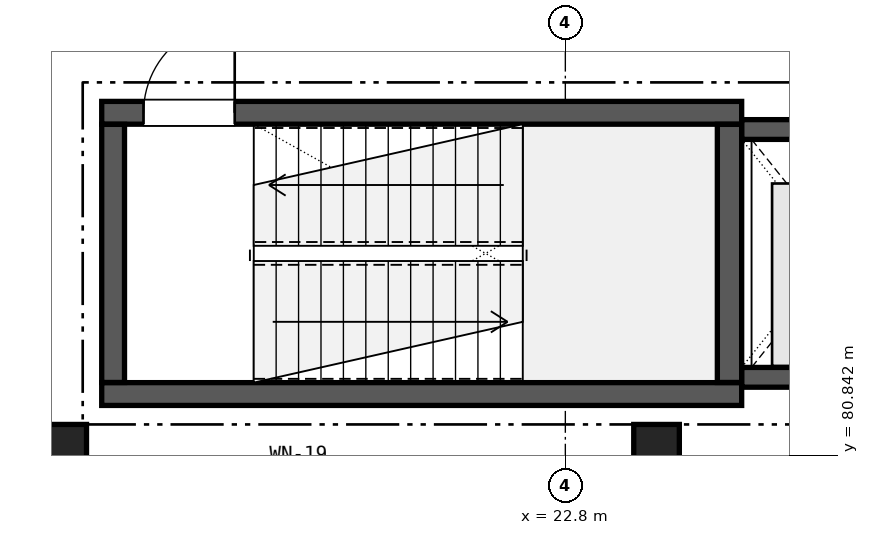
"""IFC4 building model, lengths in metres.
Left out: names, types, materials, properties, quantities, classifications, styles, units other than length and angle.
Written with IfcOpenShell. Run it as: python <this file> out.ifc"""

import sys

from ifc_helpers import new_model, si_unit, direction, frame, frame_2d, origin, origin_2d, place, context, subcontext, project, spatial, rectangle, extrude, element, fill, save


model = new_model("IFC4")
c1 = context("Model", 3, precision=1e-05, world=origin(), true_north=direction((0.0, 1.0)))
c2 = subcontext(c1, "Body", "Model", "MODEL_VIEW")
j1 = project(units=[si_unit("LENGTHUNIT", "METRE"), si_unit("PLANEANGLEUNIT", "RADIAN")], contexts=[c1])
p1 = place(None, origin())
s1 = spatial("IfcSite", under=j1, at=p1, CompositionType="ELEMENT")
p2 = place(p1, origin())
s2 = spatial("IfcBuilding", under=s1, at=p2, CompositionType="ELEMENT")
p3 = place(p2, frame((0.0, 0.0, 5.1)))
s3 = spatial("IfcBuildingStorey", under=s2, at=p3, CompositionType="ELEMENT", Elevation=5.1)
for number, where, z_axis, x_axis in (
    (1, (16.2, 80.95, 0.0), (0.0, 0.0, 1.0), (1.0, 0.0, 0.0)),
    (2, (24.0, 80.95, 0.0), (0.0, 0.0, 1.0), (1.0, 0.0, 0.0)),
):
    element("IfcColumn", number, at=place(p3, frame(where, z_axis=z_axis, x_axis=x_axis)), inside=s3, PredefinedType="COLUMN", context=c2, shape_type="SweptSolid", body=[
        extrude(rectangle(XDim=0.6, YDim=0.6, at=origin_2d()), origin(), (0.0, 0.0, 1.0), 4.42),
    ])
p4 = place(p3, frame((16.7, 81.65, 0.0), z_axis=(0.0, 0.0, 1.0), x_axis=(1.0, 0.0, 0.0)))
e3 = element("IfcWall", 3, at=p4, inside=s3, PredefinedType="SHEAR", context=c2, shape_type="SweptSolid", body=[
    extrude(rectangle(XDim=8.42, YDim=0.3, at=frame_2d((4.21, 0.0))), origin(), (0.0, 0.0, 1.0), 4.13),
])
p5 = place(p3, frame((16.7, 85.35, 0.0), z_axis=(0.0, 0.0, 1.0), x_axis=(1.0, 0.0, 0.0)))
e4 = element("IfcWall", 4, at=p5, inside=s3, PredefinedType="SHEAR", context=c2, shape_type="SweptSolid", body=[
    extrude(rectangle(XDim=8.42, YDim=0.3, at=frame_2d((4.21, 0.0))), origin(), (0.0, 0.0, 1.0), 4.13),
])
p6 = place(p5, frame((0.55, 0.0, 0.0)))
e5 = element("IfcOpeningElement", 5, at=p6, cuts=e4, PredefinedType="OPENING", context=c2, shape_type="SweptSolid", body=[
    extrude(rectangle(XDim=1.2, YDim=2.2, at=frame_2d((0.6, 1.1))), frame((0.0, 0.16, 0.0), z_axis=(0.0, -1.0, 0.0), x_axis=(1.0, 0.0, 0.0)), (0.0, 0.0, 1.0), 0.32),
])
p7 = place(p3, frame((16.85, 81.802, 0.0), z_axis=(0.0, 0.0, 1.0), x_axis=(0.0, 1.0, 0.0)))
e6 = element("IfcWall", 6, at=p7, inside=s3, PredefinedType="SHEAR", context=c2, shape_type="SweptSolid", body=[
    extrude(rectangle(XDim=3.396, YDim=0.3, at=frame_2d((1.698, 0.0))), origin(), (0.0, 0.0, 1.0), 4.13),
])
p8 = place(p3, frame((24.96, 81.802, 0.0), z_axis=(0.0, 0.0, 1.0), x_axis=(0.0, 1.0, 0.0)))
e7 = element("IfcWall", 7, at=p8, inside=s3, PredefinedType="SHEAR", context=c2, shape_type="SweptSolid", body=[
    extrude(rectangle(XDim=3.396, YDim=0.32, at=frame_2d((1.698, 0.0))), origin(), (0.0, 0.0, 1.0), 4.13),
])
p9 = place(p3, frame((25.122, 81.87, 0.0), z_axis=(0.0, 0.0, 1.0), x_axis=(1.0, 0.0, 0.0)))
e8 = element("IfcWall", 8, at=p9, inside=s3, PredefinedType="SHEAR", context=c2, shape_type="SweptSolid", body=[
    extrude(rectangle(XDim=2.658, YDim=0.26, at=frame_2d((1.329, 0.0))), origin(), (0.0, 0.0, 1.0), 4.13),
])
p10 = place(p3, frame((25.122, 85.13, 0.0), z_axis=(0.0, 0.0, 1.0), x_axis=(1.0, 0.0, 0.0)))
e9 = element("IfcWall", 9, at=p10, inside=s3, PredefinedType="SHEAR", context=c2, shape_type="SweptSolid", body=[
    extrude(rectangle(XDim=2.658, YDim=0.26, at=frame_2d((1.329, 0.0))), origin(), (0.0, 0.0, 1.0), 4.13),
])
p11 = place(p10, frame((0.679, 0.0, 0.0)))
e10 = element("IfcOpeningElement", 10, at=p11, cuts=e9, PredefinedType="OPENING", context=c2, shape_type="SweptSolid", body=[
    extrude(rectangle(XDim=1.3, YDim=2.2, at=frame_2d((0.65, 1.1))), frame((0.0, 0.14, 0.0), z_axis=(0.0, -1.0, 0.0), x_axis=(1.0, 0.0, 0.0)), (0.0, 0.0, 1.0), 0.28),
])
p12 = place(p6, origin())
e11 = element("IfcDoor", 11, at=p12, inside=s3, OperationType="SINGLE_SWING_RIGHT", PredefinedType="DOOR", context=c2, shape_type="SweptSolid", body=[
    extrude(rectangle(XDim=1.2, YDim=2.2, at=frame_2d((0.6, 1.1))), frame((0.0, 0.025, 0.0), z_axis=(0.0, -1.0, 0.0), x_axis=(1.0, 0.0, 0.0)), (0.0, 0.0, 1.0), 0.05),
])
fill(e5, e11)
save(model, sys.argv[1])
